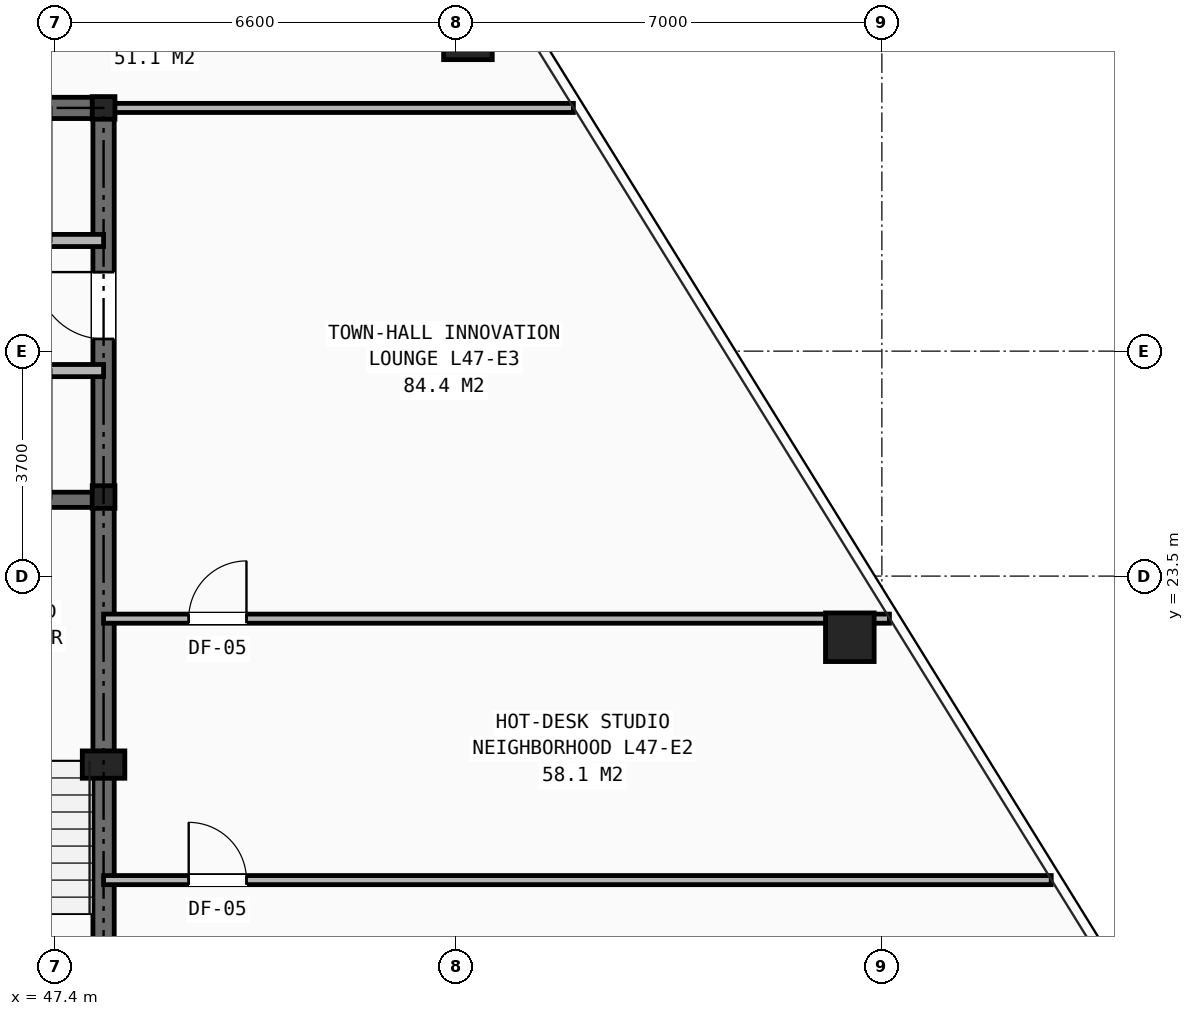
"""IFC4 building model, lengths in metres.
Left out: names, types, materials, properties, quantities, classifications, styles, units other than length and angle.
Written with IfcOpenShell. Run it as: python <this file> out.ifc"""

import sys

from ifc_helpers import new_model, si_unit, direction, frame, frame_2d, origin, origin_2d, place, context, subcontext, project, spatial, rectangle, hollow_rectangle, i_section, extrude, element, fill, save


model = new_model("IFC4")
c1 = context("Model", 3, precision=1e-05, world=origin(), true_north=direction((0.0, 1.0)))
c2 = subcontext(c1, "Body", "Model", "MODEL_VIEW")
j1 = project(units=[si_unit("LENGTHUNIT", "METRE"), si_unit("PLANEANGLEUNIT", "RADIAN")], contexts=[c1])
p1 = place(None, origin())
s1 = spatial("IfcSite", under=j1, at=p1, CompositionType="ELEMENT")
p2 = place(p1, origin())
s2 = spatial("IfcBuilding", under=s1, at=p2, CompositionType="ELEMENT")
p3 = place(p2, frame((0.0, 0.0, 165.45)))
s3 = spatial("IfcBuildingStorey", under=s2, at=p3, CompositionType="ELEMENT", Elevation=165.45)
for number, where, z_axis, x_axis in (
    (1, (48.2, 24.8, 0.0), (0.0, 0.0, 1.0), (1.0, 0.0, 0.0)),
    (2, (48.2, 31.2, 0.0), (0.0, 0.0, 1.0), (1.0, 0.0, 0.0)),
):
    element("IfcColumn", number, at=place(p3, frame(where, z_axis=z_axis, x_axis=x_axis)), inside=s3, PredefinedType="COLUMN", context=c2, shape_type="SweptSolid", body=[
        extrude(i_section(OverallWidth=0.374, OverallDepth=0.372, WebThickness=0.016, FlangeThickness=0.026, at=origin_2d()), origin(), (0.0, 0.0, 1.0), 3.45),
    ])
p4 = place(p3, frame((48.2, 20.4, 0.0), z_axis=(0.0, 0.0, 1.0), x_axis=(1.0, 0.0, 0.0)))
e3 = element("IfcColumn", 3, at=p4, inside=s3, PredefinedType="PILASTER", context=c2, shape_type="SweptSolid", body=[
    extrude(rectangle(XDim=0.7, YDim=0.45, at=origin_2d()), origin(), (0.0, 0.0, 1.0), 3.45),
])
for number, where, z_axis, x_axis in (
    (4, (60.473, 22.494, 0.0), (0.0, 0.0, 1.0), (1.0, 0.0, 0.0)),
    (5, (54.192, 32.394, 0.0), (0.0, 0.0, 1.0), (1.0, 0.0, 0.0)),
):
    element("IfcColumn", number, at=place(p3, frame(where, z_axis=z_axis, x_axis=x_axis)), inside=s3, PredefinedType="COLUMN", context=c2, shape_type="SweptSolid", body=[
        extrude(hollow_rectangle(XDim=0.8, YDim=0.8, WallThickness=0.055, at=origin_2d()), origin(), (0.0, 0.0, 1.0), 3.45),
    ])
p5 = place(p3, frame((31.8, 31.2, 0.0), z_axis=(0.0, 0.0, 1.0), x_axis=(1.0, 0.0, 0.0)))
e6 = element("IfcWall", 6, at=p5, inside=s3, PredefinedType="SHEAR", context=c2, shape_type="SweptSolid", body=[
    extrude(rectangle(XDim=16.4, YDim=0.35, at=frame_2d((8.2, 0.0))), origin(), (0.0, 0.0, 1.0), 3.21),
])
p6 = place(p3, frame((48.2, 16.4, 0.0), z_axis=(0.0, 0.0, 1.0), x_axis=(0.0, 1.0, 0.0)))
e7 = element("IfcWall", 7, at=p6, inside=s3, PredefinedType="SHEAR", context=c2, shape_type="SweptSolid", body=[
    extrude(rectangle(XDim=14.8, YDim=0.35, at=frame_2d((7.4, 0.0))), origin(), (0.0, 0.0, 1.0), 3.21),
])
p7 = place(p6, frame((11.0, 0.0, 0.0)))
e8 = element("IfcOpeningElement", 8, at=p7, cuts=e7, PredefinedType="OPENING", context=c2, shape_type="SweptSolid", body=[
    extrude(rectangle(XDim=1.1, YDim=2.15, at=frame_2d((0.55, 1.075))), frame((0.0, 0.185, 0.0), z_axis=(0.0, -1.0, 0.0), x_axis=(1.0, 0.0, 0.0)), (0.0, 0.0, 1.0), 0.37),
])
p8 = place(p3, frame((44.955, 24.755, 0.0), z_axis=(0.0, 0.0, 1.0), x_axis=(1.0, 0.0, 0.0)))
e9 = element("IfcWall", 9, at=p8, inside=s3, PredefinedType="SHEAR", context=c2, shape_type="SweptSolid", body=[
    extrude(rectangle(XDim=3.245, YDim=0.25, at=frame_2d((1.623, 0.0))), origin(), (0.0, 0.0, 1.0), 3.21),
])
p9 = place(p3, frame((33.82, 29.02, 0.0), z_axis=(0.0, 0.0, 1.0), x_axis=(1.0, 0.0, 0.0)))
e10 = element("IfcWall", 10, at=p9, inside=s3, PredefinedType="SOLIDWALL", context=c2, shape_type="SweptSolid", body=[
    extrude(rectangle(XDim=14.38, YDim=0.2, at=frame_2d((7.19, 0.0))), origin(), (0.0, 0.0, 1.0), 2.665),
])
p10 = place(p9, frame((3.92, 0.0, 0.0)))
e11 = element("IfcOpeningElement", 11, at=p10, cuts=e10, PredefinedType="OPENING", context=c2, shape_type="SweptSolid", body=[
    extrude(rectangle(XDim=0.9, YDim=2.1, at=frame_2d((0.45, 1.05))), frame((0.0, 0.11, 0.0), z_axis=(0.0, -1.0, 0.0), x_axis=(1.0, 0.0, 0.0)), (0.0, 0.0, 1.0), 0.22),
])
p11 = place(p3, frame((33.82, 26.88, 0.0), z_axis=(0.0, 0.0, 1.0), x_axis=(1.0, 0.0, 0.0)))
e12 = element("IfcWall", 12, at=p11, inside=s3, PredefinedType="SOLIDWALL", context=c2, shape_type="SweptSolid", body=[
    extrude(rectangle(XDim=14.38, YDim=0.2, at=frame_2d((7.19, 0.0))), origin(), (0.0, 0.0, 1.0), 2.665),
])
p12 = place(p11, frame((0.53, 0.0, 0.0)))
e13 = element("IfcOpeningElement", 13, at=p12, cuts=e12, PredefinedType="OPENING", context=c2, shape_type="SweptSolid", body=[
    extrude(rectangle(XDim=1.1, YDim=2.15, at=frame_2d((0.55, 1.075))), frame((0.0, 0.11, 0.0), z_axis=(0.0, -1.0, 0.0), x_axis=(1.0, 0.0, 0.0)), (0.0, 0.0, 1.0), 0.22),
])
p13 = place(p11, frame((2.69, 0.0, 0.0)))
e14 = element("IfcOpeningElement", 14, at=p13, cuts=e12, PredefinedType="OPENING", context=c2, shape_type="SweptSolid", body=[
    extrude(rectangle(XDim=1.1, YDim=2.15, at=frame_2d((0.55, 1.075))), frame((0.0, 0.11, 0.0), z_axis=(0.0, -1.0, 0.0), x_axis=(1.0, 0.0, 0.0)), (0.0, 0.0, 1.0), 0.22),
])
p14 = place(p11, frame((4.85, 0.0, 0.0)))
e15 = element("IfcOpeningElement", 15, at=p14, cuts=e12, PredefinedType="OPENING", context=c2, shape_type="SweptSolid", body=[
    extrude(rectangle(XDim=1.1, YDim=2.15, at=frame_2d((0.55, 1.075))), frame((0.0, 0.11, 0.0), z_axis=(0.0, -1.0, 0.0), x_axis=(1.0, 0.0, 0.0)), (0.0, 0.0, 1.0), 0.22),
])
p15 = place(p11, frame((7.01, 0.0, 0.0)))
e16 = element("IfcOpeningElement", 16, at=p15, cuts=e12, PredefinedType="OPENING", context=c2, shape_type="SweptSolid", body=[
    extrude(rectangle(XDim=1.1, YDim=2.15, at=frame_2d((0.55, 1.075))), frame((0.0, 0.11, 0.0), z_axis=(0.0, -1.0, 0.0), x_axis=(1.0, 0.0, 0.0)), (0.0, 0.0, 1.0), 0.22),
])
p16 = place(p3, frame((48.2, 31.2, 0.0), z_axis=(0.0, 0.0, 1.0), x_axis=(1.0, 0.0, 0.0)))
e17 = element("IfcWall", 17, at=p16, inside=s3, PredefinedType="PARTITIONING", context=c2, shape_type="SweptSolid", body=[
    extrude(rectangle(XDim=7.727, YDim=0.15, at=frame_2d((3.863, 0.0))), origin(), (0.0, 0.0, 1.0), 2.252),
])
p17 = place(p3, frame((48.2, 18.5, 0.0), z_axis=(0.0, 0.0, 1.0), x_axis=(1.0, 0.0, 0.0)))
e18 = element("IfcWall", 18, at=p17, inside=s3, PredefinedType="PARTITIONING", context=c2, shape_type="SweptSolid", body=[
    extrude(rectangle(XDim=15.585, YDim=0.15, at=frame_2d((7.792, 0.0))), origin(), (0.0, 0.0, 1.0), 2.589),
])
p18 = place(p17, frame((1.4, 0.0, 0.0)))
e19 = element("IfcOpeningElement", 19, at=p18, cuts=e18, PredefinedType="OPENING", context=c2, shape_type="SweptSolid", body=[
    extrude(rectangle(XDim=0.95, YDim=2.1, at=frame_2d((0.475, 1.05))), frame((0.0, 0.085, 0.0), z_axis=(0.0, -1.0, 0.0), x_axis=(1.0, 0.0, 0.0)), (0.0, 0.0, 1.0), 0.17),
])
p19 = place(p3, frame((48.2, 22.8, 0.0), z_axis=(0.0, 0.0, 1.0), x_axis=(1.0, 0.0, 0.0)))
e20 = element("IfcWall", 20, at=p19, inside=s3, PredefinedType="PARTITIONING", context=c2, shape_type="SweptSolid", body=[
    extrude(rectangle(XDim=12.924, YDim=0.15, at=frame_2d((6.462, 0.0))), origin(), (0.0, 0.0, 1.0), 2.589),
])
p20 = place(p19, frame((1.4, 0.0, 0.0)))
e21 = element("IfcOpeningElement", 21, at=p20, cuts=e20, PredefinedType="OPENING", context=c2, shape_type="SweptSolid", body=[
    extrude(rectangle(XDim=0.95, YDim=2.1, at=frame_2d((0.475, 1.05))), frame((0.0, 0.085, 0.0), z_axis=(0.0, -1.0, 0.0), x_axis=(1.0, 0.0, 0.0)), (0.0, 0.0, 1.0), 0.17),
])
p21 = place(p7, origin())
e22 = element("IfcDoor", 22, at=p21, inside=s3, OperationType="SINGLE_SWING_RIGHT", PredefinedType="DOOR", context=c2, shape_type="SweptSolid", body=[
    extrude(rectangle(XDim=1.1, YDim=2.15, at=frame_2d((0.55, 1.075))), frame((0.0, 0.025, 0.0), z_axis=(0.0, -1.0, 0.0), x_axis=(1.0, 0.0, 0.0)), (0.0, 0.0, 1.0), 0.05),
])
fill(e8, e22)
p22 = place(p18, origin())
e23 = element("IfcDoor", 23, at=p22, inside=s3, OperationType="SINGLE_SWING_LEFT", PredefinedType="DOOR", context=c2, shape_type="SweptSolid", body=[
    extrude(rectangle(XDim=0.95, YDim=2.1, at=frame_2d((0.475, 1.05))), frame((0.0, 0.025, 0.0), z_axis=(0.0, -1.0, 0.0), x_axis=(1.0, 0.0, 0.0)), (0.0, 0.0, 1.0), 0.05),
])
fill(e19, e23)
p23 = place(p20, origin())
e24 = element("IfcDoor", 24, at=p23, inside=s3, OperationType="SINGLE_SWING_RIGHT", PredefinedType="DOOR", context=c2, shape_type="SweptSolid", body=[
    extrude(rectangle(XDim=0.95, YDim=2.1, at=frame_2d((0.475, 1.05))), frame((0.0, 0.025, 0.0), z_axis=(0.0, -1.0, 0.0), x_axis=(1.0, 0.0, 0.0)), (0.0, 0.0, 1.0), 0.05),
])
fill(e21, e24)
save(model, sys.argv[1])
